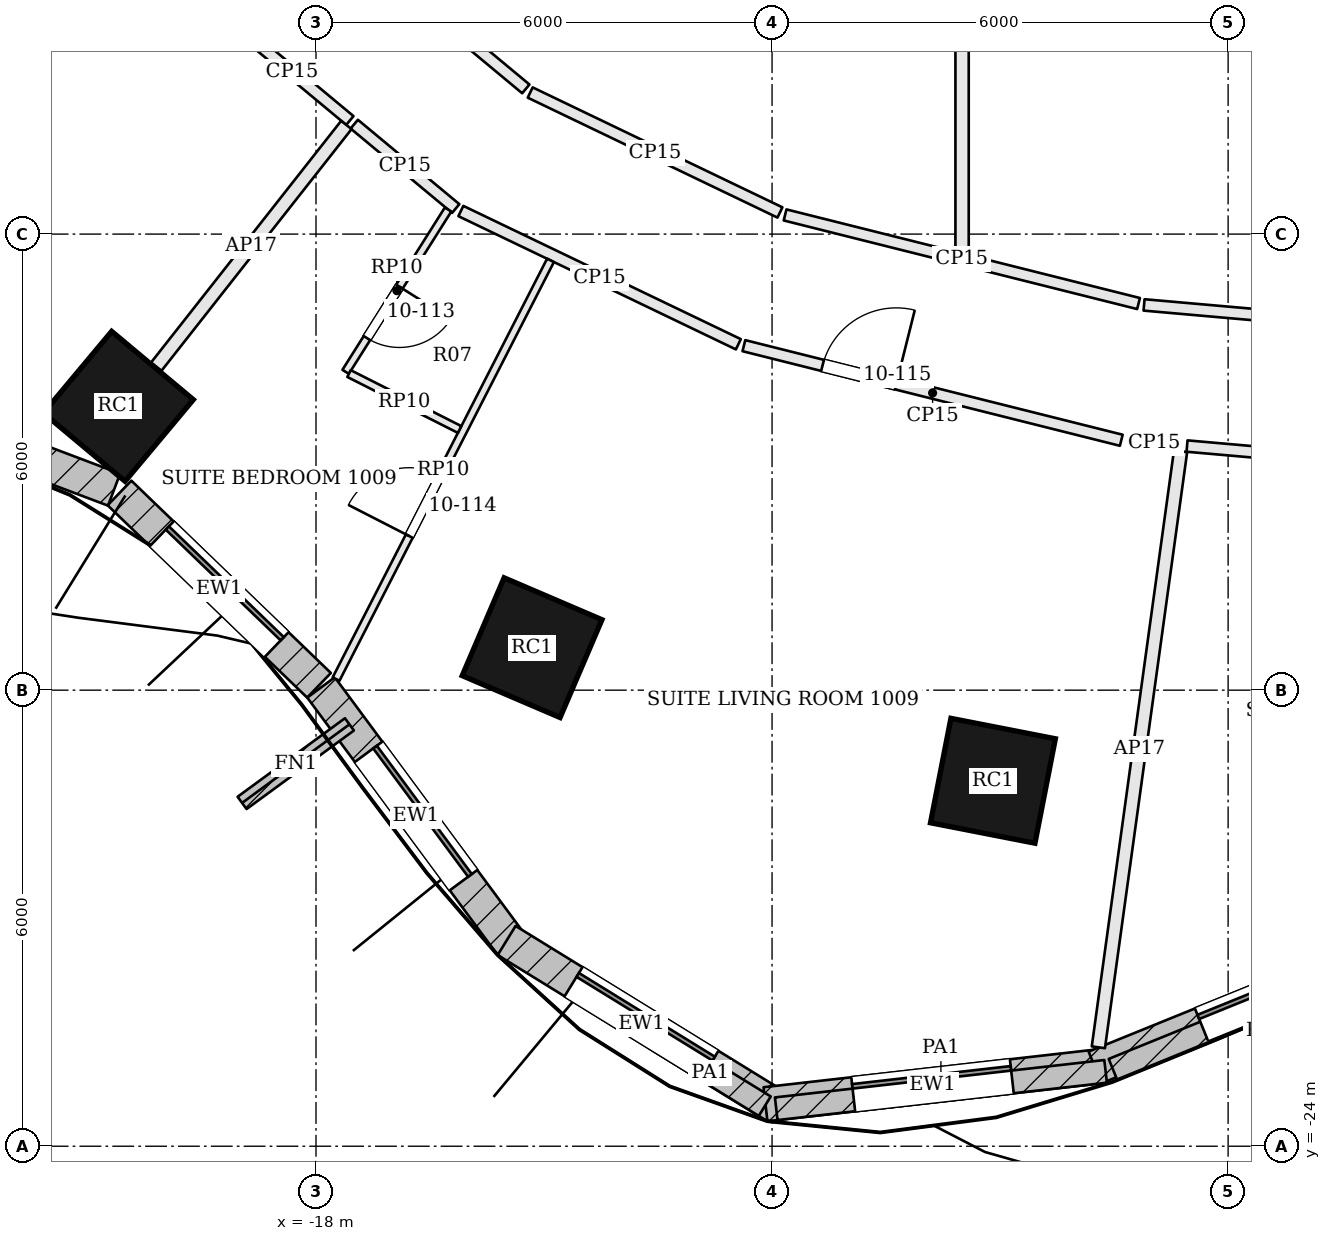
"""IFC4 building model, lengths in metres.
Left out: names, types, materials, properties, quantities, classifications, styles, units other than length and angle.
Written with IfcOpenShell. Run it as: python <this file> out.ifc"""

import sys

from ifc_helpers import new_model, si_unit, direction, frame, frame_2d, origin, origin_2d, place, context, subcontext, project, spatial, rectangle, extrude, element, fill, save


model = new_model("IFC4")
c1 = context("Model", 3, precision=1e-05, world=origin(), true_north=direction((0.0, 1.0)))
c2 = subcontext(c1, "Body", "Model", "MODEL_VIEW")
j1 = project(units=[si_unit("LENGTHUNIT", "METRE"), si_unit("PLANEANGLEUNIT", "RADIAN")], contexts=[c1])
p1 = place(None, origin())
s1 = spatial("IfcSite", under=j1, at=p1, CompositionType="ELEMENT")
p2 = place(p1, origin())
s2 = spatial("IfcBuilding", under=s1, at=p2, CompositionType="ELEMENT")
p3 = place(p2, frame((0.0, 0.0, 51.9)))
s3 = spatial("IfcBuildingStorey", under=s2, at=p3, CompositionType="ELEMENT", Elevation=51.9)
for number, where, z_axis, x_axis in (
    (1, (-20.6, -14.266, 0.0), (0.0, 0.0, 1.0), (0.767, -0.641, 0.0)),
    (2, (-15.157, -17.441, 0.0), (0.0, 0.0, 1.0), (0.919, -0.394, 0.0)),
    (3, (-9.094, -19.192, 0.0), (0.0, 0.0, 1.0), (0.981, -0.192, 0.0)),
):
    element("IfcColumn", number, at=place(p3, frame(where, z_axis=z_axis, x_axis=x_axis)), inside=s3, PredefinedType="COLUMN", context=c2, shape_type="SweptSolid", body=[
        extrude(rectangle(XDim=1.4, YDim=1.4, at=origin_2d()), origin(), (0.0, 0.0, 1.0), 3.6),
    ])
p4 = place(p3, frame((-26.431, -13.182, 0.0), z_axis=(0.0, 0.0, 1.0), x_axis=(0.935540074321, -0.35322056755, 0.0)))
e4 = element("IfcWall", 4, at=p4, inside=s3, PredefinedType="SOLIDWALL", context=c2, shape_type="SweptSolid", body=[
    extrude(rectangle(XDim=6.172, YDim=0.45, at=frame_2d((3.086, 0.0))), origin(), (0.0, 0.0, 1.0), 3.4),
])
p5 = place(p4, frame((2.036, 0.0, 0.9)))
e5 = element("IfcOpeningElement", 5, at=p5, cuts=e4, PredefinedType="OPENING", context=c2, shape_type="SweptSolid", body=[
    extrude(rectangle(XDim=2.1, YDim=2.0, at=frame_2d((1.05, 1.0))), frame((0.0, 0.235, 0.0), z_axis=(0.0, -1.0, 0.0), x_axis=(1.0, 0.0, 0.0)), (0.0, 0.0, 1.0), 0.47),
])
p6 = place(p3, frame((-20.585, -15.406, 0.0), z_axis=(0.0, 0.0, 1.0), x_axis=(0.719978118026, -0.693996764808, 0.0)))
e6 = element("IfcWall", 6, at=p6, inside=s3, PredefinedType="SOLIDWALL", context=c2, shape_type="SweptSolid", body=[
    extrude(rectangle(XDim=3.646, YDim=0.45, at=frame_2d((1.823, 0.0))), origin(), (0.0, 0.0, 1.0), 3.4),
])
p7 = place(p6, frame((0.773, 0.0, 0.9)))
e7 = element("IfcOpeningElement", 7, at=p7, cuts=e6, PredefinedType="OPENING", context=c2, shape_type="SweptSolid", body=[
    extrude(rectangle(XDim=2.1, YDim=2.0, at=frame_2d((1.05, 1.0))), frame((0.0, 0.235, 0.0), z_axis=(0.0, -1.0, 0.0), x_axis=(1.0, 0.0, 0.0)), (0.0, 0.0, 1.0), 0.47),
])
p8 = place(p3, frame((-17.934, -17.964, 0.0), z_axis=(0.0, 0.0, 1.0), x_axis=(0.594544447368, -0.804062746372, 0.0)))
e8 = element("IfcWall", 8, at=p8, inside=s3, PredefinedType="SOLIDWALL", context=c2, shape_type="SweptSolid", body=[
    extrude(rectangle(XDim=4.207, YDim=0.45, at=frame_2d((2.103, 0.0))), origin(), (0.0, 0.0, 1.0), 3.4),
])
p9 = place(p8, frame((1.053, 0.0, 0.9)))
e9 = element("IfcOpeningElement", 9, at=p9, cuts=e8, PredefinedType="OPENING", context=c2, shape_type="SweptSolid", body=[
    extrude(rectangle(XDim=2.1, YDim=2.0, at=frame_2d((1.05, 1.0))), frame((0.0, 0.235, 0.0), z_axis=(0.0, -1.0, 0.0), x_axis=(1.0, 0.0, 0.0)), (0.0, 0.0, 1.0), 0.47),
])
p10 = place(p3, frame((-15.492, -21.293, 0.0), z_axis=(0.0, 0.0, 1.0), x_axis=(0.851428967753, -0.524469935145, 0.0)))
e10 = element("IfcWall", 10, at=p10, inside=s3, PredefinedType="SOLIDWALL", context=c2, shape_type="SweptSolid", body=[
    extrude(rectangle(XDim=4.168, YDim=0.45, at=frame_2d((2.084, 0.0))), origin(), (0.0, 0.0, 1.0), 3.4),
])
p11 = place(p10, frame((1.034, 0.0, 0.9)))
e11 = element("IfcOpeningElement", 11, at=p11, cuts=e10, PredefinedType="OPENING", context=c2, shape_type="SweptSolid", body=[
    extrude(rectangle(XDim=2.1, YDim=2.0, at=frame_2d((1.05, 1.0))), frame((0.0, 0.235, 0.0), z_axis=(0.0, -1.0, 0.0), x_axis=(1.0, 0.0, 0.0)), (0.0, 0.0, 1.0), 0.47),
])
p12 = place(p3, frame((-12.086, -23.448, 0.0), z_axis=(0.0, 0.0, 1.0), x_axis=(0.993615664665, 0.112818043472, 0.0)))
e12 = element("IfcWall", 12, at=p12, inside=s3, PredefinedType="SOLIDWALL", context=c2, shape_type="SweptSolid", body=[
    extrude(rectangle(XDim=4.423, YDim=0.45, at=frame_2d((2.212, 0.0))), origin(), (0.0, 0.0, 1.0), 3.4),
])
p13 = place(p12, frame((1.162, 0.0, 0.9)))
e13 = element("IfcOpeningElement", 13, at=p13, cuts=e12, PredefinedType="OPENING", context=c2, shape_type="SweptSolid", body=[
    extrude(rectangle(XDim=2.1, YDim=2.0, at=frame_2d((1.05, 1.0))), frame((0.0, 0.235, 0.0), z_axis=(0.0, -1.0, 0.0), x_axis=(1.0, 0.0, 0.0)), (0.0, 0.0, 1.0), 0.47),
])
p14 = place(p3, frame((-7.75, -22.964, 0.0), z_axis=(0.0, 0.0, 1.0), x_axis=(0.926629703254, 0.375975255897, 0.0)))
e14 = element("IfcWall", 14, at=p14, inside=s3, PredefinedType="SOLIDWALL", context=c2, shape_type="SweptSolid", body=[
    extrude(rectangle(XDim=5.118, YDim=0.45, at=frame_2d((2.559, 0.0))), origin(), (0.0, 0.0, 1.0), 3.4),
])
p15 = place(p14, frame((1.509, 0.0, 0.9)))
e15 = element("IfcOpeningElement", 15, at=p15, cuts=e14, PredefinedType="OPENING", context=c2, shape_type="SweptSolid", body=[
    extrude(rectangle(XDim=2.1, YDim=2.0, at=frame_2d((1.05, 1.0))), frame((0.0, 0.235, 0.0), z_axis=(0.0, -1.0, 0.0), x_axis=(1.0, 0.0, 0.0)), (0.0, 0.0, 1.0), 0.47),
])
p16 = place(p3, frame((-17.56, -18.45, 0.0), z_axis=(0.0, 0.0, 1.0), x_axis=(-0.807091943364, -0.590425774299, 0.0)))
e16 = element("IfcWall", 16, at=p16, inside=s3, PredefinedType="SOLIDWALL", context=c2, shape_type="SweptSolid", body=[
    extrude(rectangle(XDim=1.75, YDim=0.2, at=frame_2d((0.875, 0.0))), origin(), (0.0, 0.0, 1.0), 3.4),
])
p17 = place(p3, frame((-13.53, -22.59, 3.6), z_axis=(0.0, 0.0, 1.0), x_axis=(0.851434206084, -0.524461431098, 0.0)))
e17 = element("IfcWall", 17, at=p17, inside=s3, PredefinedType="PARAPET", context=c2, shape_type="SweptSolid", body=[
    extrude(rectangle(XDim=1.684, YDim=0.3, at=frame_2d((0.842, 0.0))), origin(), (0.0, 0.0, 1.0), 1.1),
])
p18 = place(p3, frame((-11.945, -23.507, 3.6), z_axis=(0.0, 0.0, 1.0), x_axis=(0.993618806168, 0.11279037206, 0.0)))
e18 = element("IfcWall", 18, at=p18, inside=s3, PredefinedType="PARAPET", context=c2, shape_type="SweptSolid", body=[
    extrude(rectangle(XDim=4.362, YDim=0.3, at=frame_2d((2.181, 0.0))), origin(), (0.0, 0.0, 1.0), 1.1),
])
p19 = place(p3, frame((-7.514, -22.99, 3.6), z_axis=(0.0, 0.0, 1.0), x_axis=(0.926627413994, 0.375980897966, 0.0)))
e19 = element("IfcWall", 19, at=p19, inside=s3, PredefinedType="PARAPET", context=c2, shape_type="SweptSolid", body=[
    extrude(rectangle(XDim=4.315, YDim=0.3, at=frame_2d((2.157, 0.0))), origin(), (0.0, 0.0, 1.0), 1.1),
])
p20 = place(p3, frame((-19.074, -9.241, 0.0), z_axis=(0.0, 0.0, 1.0), x_axis=(0.768787772902, -0.639503995481, 0.0)))
e20 = element("IfcWall", 20, at=p20, inside=s3, PredefinedType="PARTITIONING", context=c2, shape_type="SweptSolid", body=[
    extrude(rectangle(XDim=1.977, YDim=0.15, at=frame_2d((0.989, 0.0))), origin(), (0.0, 0.0, 1.0), 2.68),
])
p21 = place(p3, frame((-20.102, -13.744, 0.0), z_axis=(0.0, 0.0, 1.0), x_axis=(0.618226596267, 0.785999920908, 0.0)))
e21 = element("IfcWall", 21, at=p21, inside=s3, PredefinedType="PARTITIONING", context=c2, shape_type="SweptSolid", body=[
    extrude(rectangle(XDim=4.045, YDim=0.175, at=frame_2d((2.023, 0.0))), origin(), (0.0, 0.0, 1.0), 2.68),
])
p22 = place(p3, frame((-17.497, -10.554, 0.0), z_axis=(0.0, 0.0, 1.0), x_axis=(0.768889363983, -0.63938184675, 0.0)))
e22 = element("IfcWall", 22, at=p22, inside=s3, PredefinedType="PARTITIONING", context=c2, shape_type="SweptSolid", body=[
    extrude(rectangle(XDim=1.736, YDim=0.15, at=frame_2d((0.868, 0.0))), origin(), (0.0, 0.0, 1.0), 2.68),
])
p23 = place(p3, frame((-16.094, -11.696, 0.0), z_axis=(0.0, 0.0, 1.0), x_axis=(0.901427088992, -0.432930945108, 0.0)))
e23 = element("IfcWall", 23, at=p23, inside=s3, PredefinedType="PARTITIONING", context=c2, shape_type="SweptSolid", body=[
    extrude(rectangle(XDim=4.05, YDim=0.15, at=frame_2d((2.025, 0.0))), origin(), (0.0, 0.0, 1.0), 2.68),
])
p24 = place(p3, frame((-12.371, -13.468, 0.0), z_axis=(0.0, 0.0, 1.0), x_axis=(0.969987994087, -0.243152814764, 0.0)))
e24 = element("IfcWall", 24, at=p24, inside=s3, PredefinedType="PARTITIONING", context=c2, shape_type="SweptSolid", body=[
    extrude(rectangle(XDim=5.119, YDim=0.15, at=frame_2d((2.559, 0.0))), origin(), (0.0, 0.0, 1.0), 2.68),
])
p25 = place(p24, frame((1.067, 0.0, 0.0)))
e25 = element("IfcOpeningElement", 25, at=p25, cuts=e24, PredefinedType="OPENING", context=c2, shape_type="SweptSolid", body=[
    extrude(rectangle(XDim=1.0, YDim=2.1, at=frame_2d((0.5, 1.05))), frame((0.0, 0.085, 0.0), z_axis=(0.0, -1.0, 0.0), x_axis=(1.0, 0.0, 0.0)), (0.0, 0.0, 1.0), 0.17),
])
p26 = place(p3, frame((-7.331, -14.719, 0.0), z_axis=(0.0, 0.0, 1.0), x_axis=(0.996148207285, -0.087685512617, 0.0)))
e26 = element("IfcWall", 26, at=p26, inside=s3, PredefinedType="PARTITIONING", context=c2, shape_type="SweptSolid", body=[
    extrude(rectangle(XDim=0.718, YDim=0.15, at=frame_2d((0.359, 0.0))), origin(), (0.0, 0.0, 1.0), 2.68),
])
p27 = place(p3, frame((-7.707, -22.699, 0.0), z_axis=(0.0, 0.0, 1.0), x_axis=(0.13661443917, 0.990624295589, 0.0)))
e27 = element("IfcWall", 27, at=p27, inside=s3, PredefinedType="PARTITIONING", context=c2, shape_type="SweptSolid", body=[
    extrude(rectangle(XDim=7.917, YDim=0.175, at=frame_2d((3.958, 0.0))), origin(), (0.0, 0.0, 1.0), 2.68),
])
p28 = place(p3, frame((-6.541, -14.789, 0.0), z_axis=(0.0, 0.0, 1.0), x_axis=(0.996138192674, -0.087799208971, 0.0)))
e28 = element("IfcWall", 28, at=p28, inside=s3, PredefinedType="PARTITIONING", context=c2, shape_type="SweptSolid", body=[
    extrude(rectangle(XDim=4.368, YDim=0.15, at=frame_2d((2.184, 0.0))), origin(), (0.0, 0.0, 1.0), 2.68),
])
p29 = place(p3, frame((-2.208, -13.364, 0.0), z_axis=(0.0, 0.0, 1.0), x_axis=(-0.996134962793, 0.087835846335, 0.0)))
e29 = element("IfcWall", 29, at=p29, inside=s3, PredefinedType="PARTITIONING", context=c2, shape_type="SweptSolid", body=[
    extrude(rectangle(XDim=4.917, YDim=0.15, at=frame_2d((2.458, 0.0))), origin(), (0.0, 0.0, 1.0), 2.68),
])
p30 = place(p3, frame((-7.178, -12.914, 0.0), z_axis=(0.0, 0.0, 1.0), x_axis=(-0.969983523639, 0.243170647628, 0.0)))
e30 = element("IfcWall", 30, at=p30, inside=s3, PredefinedType="PARTITIONING", context=c2, shape_type="SweptSolid", body=[
    extrude(rectangle(XDim=4.794, YDim=0.15, at=frame_2d((2.397, 0.0))), origin(), (0.0, 0.0, 1.0), 2.68),
])
p31 = place(p3, frame((-11.896, -11.715, 0.0), z_axis=(0.0, 0.0, 1.0), x_axis=(-0.901466605799, 0.432848655571, 0.0)))
e31 = element("IfcWall", 31, at=p31, inside=s3, PredefinedType="PARTITIONING", context=c2, shape_type="SweptSolid", body=[
    extrude(rectangle(XDim=3.645, YDim=0.15, at=frame_2d((1.822, 0.0))), origin(), (0.0, 0.0, 1.0), 2.68),
])
p32 = place(p3, frame((-15.24, -10.09, 0.0), z_axis=(0.0, 0.0, 1.0), x_axis=(-0.768799656378, 0.639489709341, 0.0)))
e32 = element("IfcWall", 32, at=p32, inside=s3, PredefinedType="PARTITIONING", context=c2, shape_type="SweptSolid", body=[
    extrude(rectangle(XDim=3.285, YDim=0.15, at=frame_2d((1.643, 0.0))), origin(), (0.0, 0.0, 1.0), 2.68),
])
p33 = place(p3, frame((-17.736, -17.854, 0.0), z_axis=(0.0, 0.0, 1.0), x_axis=(0.455840045042, 0.890061713218, 0.0)))
e33 = element("IfcWall", 33, at=p33, inside=s3, PredefinedType="PARTITIONING", context=c2, shape_type="SweptSolid", body=[
    extrude(rectangle(XDim=6.189, YDim=0.1, at=frame_2d((3.094, 0.0))), origin(), (0.0, 0.0, 1.0), 2.898),
])
p34 = place(p33, frame((2.113, 0.0, 0.0)))
e34 = element("IfcOpeningElement", 34, at=p34, cuts=e33, PredefinedType="OPENING", context=c2, shape_type="SweptSolid", body=[
    extrude(rectangle(XDim=0.9, YDim=2.4, at=frame_2d((0.45, 1.2))), frame((0.0, 0.06, 0.0), z_axis=(0.0, -1.0, 0.0), x_axis=(1.0, 0.0, 0.0)), (0.0, 0.0, 1.0), 0.12),
])
p35 = place(p3, frame((-16.262, -11.677, 0.0), z_axis=(0.0, 0.0, 1.0), x_axis=(-0.533687401526, -0.845681829918, 0.0)))
e35 = element("IfcWall", 35, at=p35, inside=s3, PredefinedType="PARTITIONING", context=c2, shape_type="SweptSolid", body=[
    extrude(rectangle(XDim=2.525, YDim=0.1, at=frame_2d((1.263, 0.0))), origin(), (0.0, 0.0, 1.0), 2.898),
])
p36 = place(p35, frame((1.2, 0.0, 0.0)))
e36 = element("IfcOpeningElement", 36, at=p36, cuts=e35, PredefinedType="OPENING", context=c2, shape_type="SweptSolid", body=[
    extrude(rectangle(XDim=0.8, YDim=2.1, at=frame_2d((0.4, 1.05))), frame((0.0, 0.06, 0.0), z_axis=(0.0, -1.0, 0.0), x_axis=(1.0, 0.0, 0.0)), (0.0, 0.0, 1.0), 0.12),
])
p37 = place(p3, frame((-17.565, -13.835, 0.0), z_axis=(0.0, 0.0, 1.0), x_axis=(0.892351112888, -0.451341878544, 0.0)))
e37 = element("IfcWall", 37, at=p37, inside=s3, PredefinedType="PARTITIONING", context=c2, shape_type="SweptSolid", body=[
    extrude(rectangle(XDim=1.63, YDim=0.1, at=frame_2d((0.815, 0.0))), origin(), (0.0, 0.0, 1.0), 2.898),
])
p38 = place(p3, frame((-9.5, -12.257, 0.0), z_axis=(0.0, 0.0, 1.0), x_axis=(0.0, 1.0, 0.0)))
e38 = element("IfcWall", 38, at=p38, inside=s3, PredefinedType="PARTITIONING", context=c2, shape_type="SweptSolid", body=[
    extrude(rectangle(XDim=7.382, YDim=0.175, at=frame_2d((3.691, 0.0))), origin(), (0.0, 0.0, 1.0), 2.68),
])
p39 = place(p7, origin())
e39 = element("IfcWindow", 39, at=p39, inside=s3, PartitioningType="SINGLE_PANEL", PredefinedType="WINDOW", context=c2, shape_type="SweptSolid", body=[
    extrude(rectangle(XDim=2.1, YDim=2.0, at=frame_2d((1.05, 1.0))), frame((0.0, 0.135, 0.0), z_axis=(0.0, -1.0, 0.0), x_axis=(1.0, 0.0, 0.0)), (0.0, 0.0, 1.0), 0.06),
])
fill(e7, e39)
p40 = place(p9, origin())
e40 = element("IfcWindow", 40, at=p40, inside=s3, PartitioningType="SINGLE_PANEL", PredefinedType="WINDOW", context=c2, shape_type="SweptSolid", body=[
    extrude(rectangle(XDim=2.1, YDim=2.0, at=frame_2d((1.05, 1.0))), frame((0.0, 0.135, 0.0), z_axis=(0.0, -1.0, 0.0), x_axis=(1.0, 0.0, 0.0)), (0.0, 0.0, 1.0), 0.06),
])
fill(e9, e40)
p41 = place(p11, origin())
e41 = element("IfcWindow", 41, at=p41, inside=s3, PartitioningType="SINGLE_PANEL", PredefinedType="WINDOW", context=c2, shape_type="SweptSolid", body=[
    extrude(rectangle(XDim=2.1, YDim=2.0, at=frame_2d((1.05, 1.0))), frame((0.0, 0.135, 0.0), z_axis=(0.0, -1.0, 0.0), x_axis=(1.0, 0.0, 0.0)), (0.0, 0.0, 1.0), 0.06),
])
fill(e11, e41)
p42 = place(p13, origin())
e42 = element("IfcWindow", 42, at=p42, inside=s3, PartitioningType="SINGLE_PANEL", PredefinedType="WINDOW", context=c2, shape_type="SweptSolid", body=[
    extrude(rectangle(XDim=2.1, YDim=2.0, at=frame_2d((1.05, 1.0))), frame((0.0, 0.135, 0.0), z_axis=(0.0, -1.0, 0.0), x_axis=(1.0, 0.0, 0.0)), (0.0, 0.0, 1.0), 0.06),
])
fill(e13, e42)
p43 = place(p15, origin())
e43 = element("IfcWindow", 43, at=p43, inside=s3, PartitioningType="SINGLE_PANEL", PredefinedType="WINDOW", context=c2, shape_type="SweptSolid", body=[
    extrude(rectangle(XDim=2.1, YDim=2.0, at=frame_2d((1.05, 1.0))), frame((0.0, 0.135, 0.0), z_axis=(0.0, -1.0, 0.0), x_axis=(1.0, 0.0, 0.0)), (0.0, 0.0, 1.0), 0.06),
])
fill(e15, e43)
p44 = place(p36, origin())
e44 = element("IfcDoor", 44, at=p44, inside=s3, OperationType="SINGLE_SWING_LEFT", PredefinedType="DOOR", context=c2, shape_type="SweptSolid", body=[
    extrude(rectangle(XDim=0.8, YDim=2.1, at=frame_2d((0.4, 1.05))), frame((0.0, 0.025, 0.0), z_axis=(0.0, -1.0, 0.0), x_axis=(1.0, 0.0, 0.0)), (0.0, 0.0, 1.0), 0.05),
])
fill(e36, e44)
p45 = place(p34, origin())
e45 = element("IfcDoor", 45, at=p45, inside=s3, OperationType="SINGLE_SWING_LEFT", PredefinedType="DOOR", context=c2, shape_type="SweptSolid", body=[
    extrude(rectangle(XDim=0.9, YDim=2.4, at=frame_2d((0.45, 1.2))), frame((0.0, 0.025, 0.0), z_axis=(0.0, -1.0, 0.0), x_axis=(1.0, 0.0, 0.0)), (0.0, 0.0, 1.0), 0.05),
])
fill(e34, e45)
p46 = place(p25, origin())
e46 = element("IfcDoor", 46, at=p46, inside=s3, OperationType="SINGLE_SWING_RIGHT", PredefinedType="DOOR", context=c2, shape_type="SweptSolid", body=[
    extrude(rectangle(XDim=1.0, YDim=2.1, at=frame_2d((0.5, 1.05))), frame((0.0, 0.025, 0.0), z_axis=(0.0, -1.0, 0.0), x_axis=(1.0, 0.0, 0.0)), (0.0, 0.0, 1.0), 0.05),
])
fill(e25, e46)
save(model, sys.argv[1])
